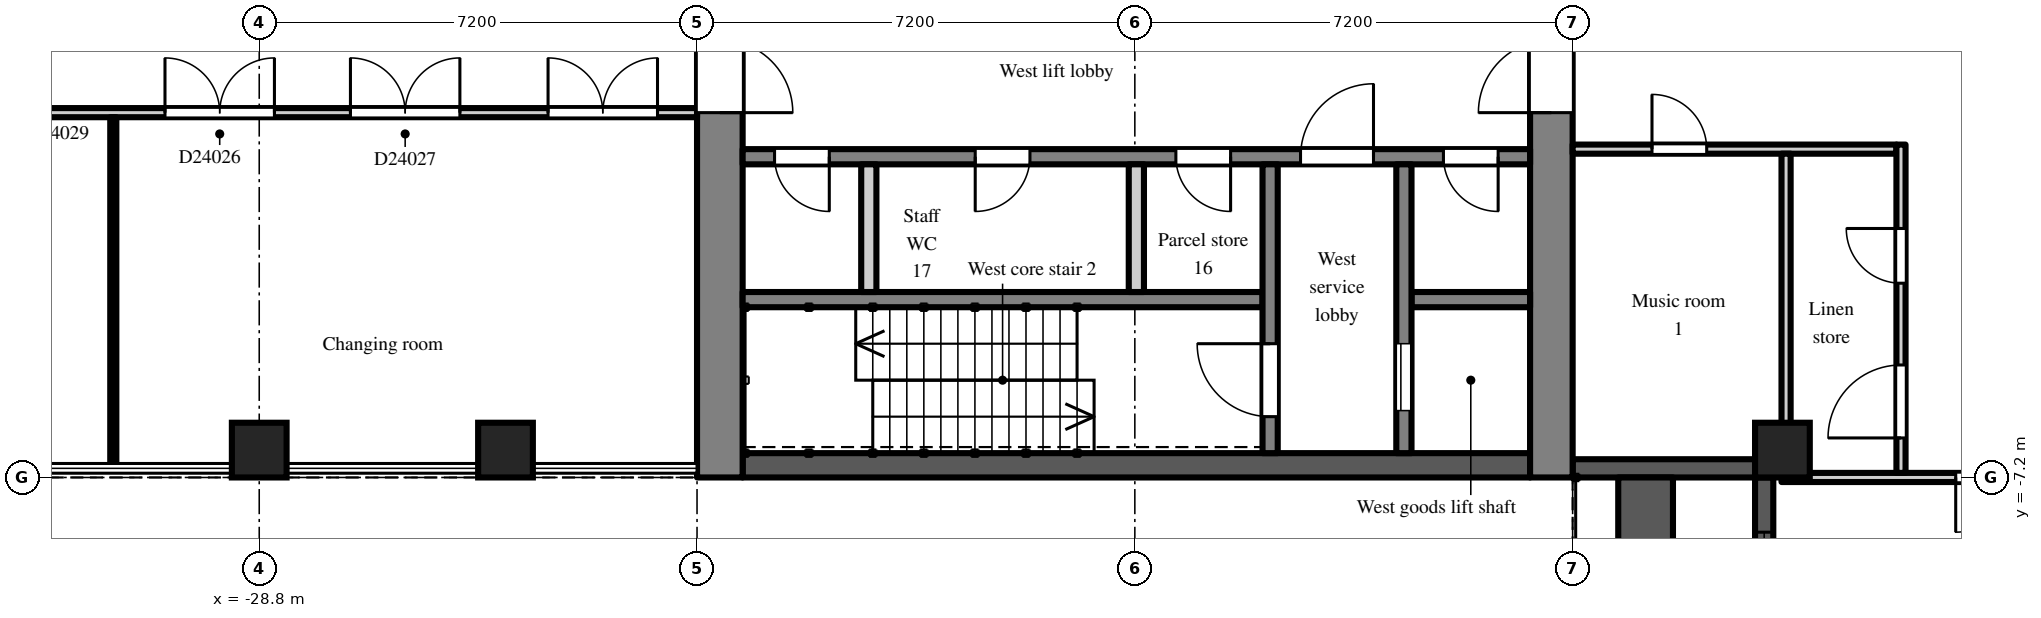
"""IFC4 building model, lengths in metres.
Left out: names, types, materials, properties, quantities, classifications, styles, units other than length and angle.
Written with IfcOpenShell. Run it as: python <this file> out.ifc"""

import sys

from ifc_helpers import new_model, si_unit, direction, frame, frame_2d, origin, origin_2d, place, context, subcontext, project, spatial, rectangle, extrude, element, fill, save


model = new_model("IFC4")
c1 = context("Model", 3, precision=1e-05, world=origin(), true_north=direction((0.0, 1.0)))
c2 = subcontext(c1, "Body", "Model", "MODEL_VIEW")
j1 = project(units=[si_unit("LENGTHUNIT", "METRE"), si_unit("PLANEANGLEUNIT", "RADIAN")], contexts=[c1])
p1 = place(None, origin())
s1 = spatial("IfcSite", under=j1, at=p1, CompositionType="ELEMENT")
p2 = place(p1, origin())
s2 = spatial("IfcBuilding", under=s1, at=p2, CompositionType="ELEMENT")
p3 = place(p2, frame((0.0, 0.0, 166.5)))
s3 = spatial("IfcBuildingStorey", under=s2, at=p3, CompositionType="ELEMENT", Elevation=166.5)
for number, where, z_axis, x_axis in (
    (1, (-28.8, -6.75, 0.0), (0.0, 0.0, 1.0), (1.0, 0.0, 0.0)),
    (2, (-24.75, -6.75, 0.0), (0.0, 0.0, 1.0), (1.0, 0.0, 0.0)),
    (3, (-3.75, -6.75, 0.0), (0.0, 0.0, 1.0), (1.0, 0.0, 0.0)),
):
    element("IfcColumn", number, at=place(p3, frame(where, z_axis=z_axis, x_axis=x_axis)), inside=s3, PredefinedType="COLUMN", context=c2, shape_type="SweptSolid", body=[
        extrude(rectangle(XDim=0.9, YDim=0.9, at=origin_2d()), origin(), (0.0, 0.0, 1.0), 4.2),
    ])
p4 = place(p3, frame((-7.2, -7.05, 0.0), z_axis=(0.0, 0.0, 1.0), x_axis=(1.0, 0.0, 0.0)))
e4 = element("IfcWall", 4, at=p4, inside=s3, PredefinedType="SOLIDWALL", context=c2, shape_type="SweptSolid", body=[
    extrude(rectangle(XDim=3.0, YDim=0.3, at=frame_2d((1.5, 0.0))), origin(), (0.0, 0.0, 1.0), 3.4),
])
p5 = place(p3, frame((-4.05, -7.2, 0.0), z_axis=(0.0, 0.0, 1.0), x_axis=(0.0, -1.0, 0.0)))
e5 = element("IfcWall", 5, at=p5, inside=s3, PredefinedType="SOLIDWALL", context=c2, shape_type="SweptSolid", body=[
    extrude(rectangle(XDim=7.2, YDim=0.3, at=frame_2d((3.6, 0.0))), origin(), (0.0, 0.0, 1.0), 3.4),
])
p6 = place(p5, frame((3.0, 0.0, 0.0)))
e6 = element("IfcOpeningElement", 6, at=p6, cuts=e5, PredefinedType="OPENING", context=c2, shape_type="SweptSolid", body=[
    extrude(rectangle(XDim=1.2, YDim=2.05, at=frame_2d((0.6, 1.025))), frame((0.0, 0.16, 0.0), z_axis=(0.0, -1.0, 0.0), x_axis=(1.0, 0.0, 0.0)), (0.0, 0.0, 1.0), 0.32),
])
p7 = place(p5, frame((0.9, 0.0, 0.2)))
e7 = element("IfcOpeningElement", 7, at=p7, cuts=e5, PredefinedType="OPENING", context=c2, shape_type="SweptSolid", body=[
    extrude(rectangle(XDim=1.8, YDim=1.85, at=frame_2d((0.9, 0.925))), frame((0.0, 0.16, 0.0), z_axis=(0.0, -1.0, 0.0), x_axis=(1.0, 0.0, 0.0)), (0.0, 0.0, 1.0), 0.32),
])
p8 = place(p5, frame((4.5, 0.0, 0.2)))
e8 = element("IfcOpeningElement", 8, at=p8, cuts=e5, PredefinedType="OPENING", context=c2, shape_type="SweptSolid", body=[
    extrude(rectangle(XDim=1.8, YDim=1.85, at=frame_2d((0.9, 0.925))), frame((0.0, 0.16, 0.0), z_axis=(0.0, -1.0, 0.0), x_axis=(1.0, 0.0, 0.0)), (0.0, 0.0, 1.0), 0.32),
])
p9 = place(p3, frame((-6.0, -14.4, 0.0), z_axis=(0.0, 0.0, 1.0), x_axis=(0.0, 1.0, 0.0)))
e9 = element("IfcWall", 9, at=p9, inside=s3, PredefinedType="PARAPET", context=c2, shape_type="SweptSolid", body=[
    extrude(rectangle(XDim=7.2, YDim=0.9, at=frame_2d((3.6, 0.0))), origin(), (0.0, 0.0, 1.0), 0.8),
])
p10 = place(p3, frame((-7.55, -7.2, 0.0), z_axis=(0.0, 0.0, 1.0), x_axis=(0.0, 1.0, 0.0)))
e10 = element("IfcWall", 10, at=p10, inside=s3, PredefinedType="SHEAR", context=c2, shape_type="SweptSolid", body=[
    extrude(rectangle(XDim=14.4, YDim=0.7, at=frame_2d((7.2, 0.0))), origin(), (0.0, 0.0, 1.0), 3.8),
])
p11 = place(p10, frame((6.0, 0.0, 0.0)))
e11 = element("IfcOpeningElement", 11, at=p11, cuts=e10, PredefinedType="OPENING", context=c2, shape_type="SweptSolid", body=[
    extrude(rectangle(XDim=2.4, YDim=2.2, at=frame_2d((1.2, 1.1))), frame((0.0, 0.36, 0.0), z_axis=(0.0, -1.0, 0.0), x_axis=(1.0, 0.0, 0.0)), (0.0, 0.0, 1.0), 0.72),
])
p12 = place(p3, frame((-21.225, -7.2, 0.0), z_axis=(0.0, 0.0, 1.0), x_axis=(0.0, 1.0, 0.0)))
e12 = element("IfcWall", 12, at=p12, inside=s3, PredefinedType="SHEAR", context=c2, shape_type="SweptSolid", body=[
    extrude(rectangle(XDim=14.4, YDim=0.75, at=frame_2d((7.2, 0.0))), origin(), (0.0, 0.0, 1.0), 3.8),
])
p13 = place(p12, frame((6.0, 0.0, 0.0)))
e13 = element("IfcOpeningElement", 13, at=p13, cuts=e12, PredefinedType="OPENING", context=c2, shape_type="SweptSolid", body=[
    extrude(rectangle(XDim=2.4, YDim=2.2, at=frame_2d((1.2, 1.1))), frame((0.0, 0.385, 0.0), z_axis=(0.0, -1.0, 0.0), x_axis=(1.0, 0.0, 0.0)), (0.0, 0.0, 1.0), 0.77),
])
p14 = place(p3, frame((-7.9, -7.0, 0.0), z_axis=(0.0, 0.0, 1.0), x_axis=(-1.0, 0.0, 0.0)))
e14 = element("IfcWall", 14, at=p14, inside=s3, PredefinedType="SHEAR", context=c2, shape_type="SweptSolid", body=[
    extrude(rectangle(XDim=12.95, YDim=0.4, at=frame_2d((6.475, 0.0))), origin(), (0.0, 0.0, 1.0), 3.8),
])
p15 = place(p3, frame((-7.9, -1.925, 0.0), z_axis=(0.0, 0.0, 1.0), x_axis=(-1.0, 0.0, 0.0)))
e15 = element("IfcWall", 15, at=p15, inside=s3, PredefinedType="SHEAR", context=c2, shape_type="SweptSolid", body=[
    extrude(rectangle(XDim=12.95, YDim=0.25, at=frame_2d((6.475, 0.0))), origin(), (0.0, 0.0, 1.0), 3.8),
])
p16 = place(p15, frame((0.525, 0.0, 0.0)))
e16 = element("IfcOpeningElement", 16, at=p16, cuts=e15, PredefinedType="OPENING", context=c2, shape_type="SweptSolid", body=[
    extrude(rectangle(XDim=0.9, YDim=2.1, at=frame_2d((0.45, 1.05))), frame((0.0, 0.135, 0.0), z_axis=(0.0, -1.0, 0.0), x_axis=(1.0, 0.0, 0.0)), (0.0, 0.0, 1.0), 0.27),
])
p17 = place(p15, frame((2.575, 0.0, 0.0)))
e17 = element("IfcOpeningElement", 17, at=p17, cuts=e15, PredefinedType="OPENING", context=c2, shape_type="SweptSolid", body=[
    extrude(rectangle(XDim=1.2, YDim=2.1, at=frame_2d((0.6, 1.05))), frame((0.0, 0.135, 0.0), z_axis=(0.0, -1.0, 0.0), x_axis=(1.0, 0.0, 0.0)), (0.0, 0.0, 1.0), 0.27),
])
p18 = place(p15, frame((4.925, 0.0, 0.0)))
e18 = element("IfcOpeningElement", 18, at=p18, cuts=e15, PredefinedType="OPENING", context=c2, shape_type="SweptSolid", body=[
    extrude(rectangle(XDim=0.9, YDim=2.1, at=frame_2d((0.45, 1.05))), frame((0.0, 0.135, 0.0), z_axis=(0.0, -1.0, 0.0), x_axis=(1.0, 0.0, 0.0)), (0.0, 0.0, 1.0), 0.27),
])
p19 = place(p15, frame((8.225, 0.0, 0.0)))
e19 = element("IfcOpeningElement", 19, at=p19, cuts=e15, PredefinedType="OPENING", context=c2, shape_type="SweptSolid", body=[
    extrude(rectangle(XDim=0.9, YDim=2.1, at=frame_2d((0.45, 1.05))), frame((0.0, 0.135, 0.0), z_axis=(0.0, -1.0, 0.0), x_axis=(1.0, 0.0, 0.0)), (0.0, 0.0, 1.0), 0.27),
])
p20 = place(p15, frame((11.525, 0.0, 0.0)))
e20 = element("IfcOpeningElement", 20, at=p20, cuts=e15, PredefinedType="OPENING", context=c2, shape_type="SweptSolid", body=[
    extrude(rectangle(XDim=0.9, YDim=2.1, at=frame_2d((0.45, 1.05))), frame((0.0, 0.135, 0.0), z_axis=(0.0, -1.0, 0.0), x_axis=(1.0, 0.0, 0.0)), (0.0, 0.0, 1.0), 0.27),
])
p21 = place(p3, frame((-7.9, -4.275, 0.0), z_axis=(0.0, 0.0, 1.0), x_axis=(-1.0, 0.0, 0.0)))
e21 = element("IfcWall", 21, at=p21, inside=s3, PredefinedType="SHEAR", context=c2, shape_type="SweptSolid", body=[
    extrude(rectangle(XDim=1.95, YDim=0.25, at=frame_2d((0.975, 0.0))), origin(), (0.0, 0.0, 1.0), 3.8),
])
p22 = place(p3, frame((-12.3, -4.275, 0.0), z_axis=(0.0, 0.0, 1.0), x_axis=(-1.0, 0.0, 0.0)))
e22 = element("IfcWall", 22, at=p22, inside=s3, PredefinedType="SHEAR", context=c2, shape_type="SweptSolid", body=[
    extrude(rectangle(XDim=8.55, YDim=0.25, at=frame_2d((4.275, 0.0))), origin(), (0.0, 0.0, 1.0), 3.8),
])
p23 = place(p3, frame((-9.975, -2.05, 0.0), z_axis=(0.0, 0.0, 1.0), x_axis=(0.0, -1.0, 0.0)))
e23 = element("IfcWall", 23, at=p23, inside=s3, PredefinedType="SHEAR", context=c2, shape_type="SweptSolid", body=[
    extrude(rectangle(XDim=4.75, YDim=0.25, at=frame_2d((2.375, 0.0))), origin(), (0.0, 0.0, 1.0), 3.8),
])
p24 = place(p23, frame((2.95, 0.0, 0.0)))
e24 = element("IfcOpeningElement", 24, at=p24, cuts=e23, PredefinedType="OPENING", context=c2, shape_type="SweptSolid", body=[
    extrude(rectangle(XDim=1.1, YDim=2.1, at=frame_2d((0.55, 1.05))), frame((0.0, 0.135, 0.0), z_axis=(0.0, -1.0, 0.0), x_axis=(1.0, 0.0, 0.0)), (0.0, 0.0, 1.0), 0.27),
])
p25 = place(p3, frame((-12.175, -2.05, 0.0), z_axis=(0.0, 0.0, 1.0), x_axis=(0.0, -1.0, 0.0)))
e25 = element("IfcWall", 25, at=p25, inside=s3, PredefinedType="SHEAR", context=c2, shape_type="SweptSolid", body=[
    extrude(rectangle(XDim=4.75, YDim=0.25, at=frame_2d((2.375, 0.0))), origin(), (0.0, 0.0, 1.0), 3.8),
])
p26 = place(p25, frame((2.95, 0.0, 0.0)))
e26 = element("IfcOpeningElement", 26, at=p26, cuts=e25, PredefinedType="OPENING", context=c2, shape_type="SweptSolid", body=[
    extrude(rectangle(XDim=1.2, YDim=2.1, at=frame_2d((0.6, 1.05))), frame((0.0, 0.135, 0.0), z_axis=(0.0, -1.0, 0.0), x_axis=(1.0, 0.0, 0.0)), (0.0, 0.0, 1.0), 0.27),
])
for number, where, z_axis, x_axis in (
    (27, (-14.375, -2.05, 0.0), (0.0, 0.0, 1.0), (0.0, -1.0, 0.0)),
    (28, (-18.775, -2.05, 0.0), (0.0, 0.0, 1.0), (0.0, -1.0, 0.0)),
):
    element("IfcWall", number, at=place(p3, frame(where, z_axis=z_axis, x_axis=x_axis)), inside=s3, PredefinedType="PARTITIONING", context=c2, shape_type="SweptSolid", body=[
        extrude(rectangle(XDim=2.1, YDim=0.25, at=frame_2d((1.05, 0.0))), origin(), (0.0, 0.0, 1.0), 3.8),
    ])
p27 = place(p3, frame((-36.5, -1.2, 0.0), z_axis=(0.0, 0.0, 1.0), x_axis=(1.0, 0.0, 0.0)))
e29 = element("IfcWall", 29, at=p27, inside=s3, PredefinedType="PARTITIONING", context=c2, shape_type="SweptSolid", body=[
    extrude(rectangle(XDim=14.9, YDim=0.15, at=frame_2d((7.45, 0.0))), origin(), (0.0, 0.0, 1.0), 3.8),
])
p28 = place(p27, frame((6.15, 0.0, 0.0)))
e30 = element("IfcOpeningElement", 30, at=p28, cuts=e29, PredefinedType="OPENING", context=c2, shape_type="SweptSolid", body=[
    extrude(rectangle(XDim=1.8, YDim=2.1, at=frame_2d((0.9, 1.05))), frame((0.0, 0.085, 0.0), z_axis=(0.0, -1.0, 0.0), x_axis=(1.0, 0.0, 0.0)), (0.0, 0.0, 1.0), 0.17),
])
p29 = place(p27, frame((9.2, 0.0, 0.0)))
e31 = element("IfcOpeningElement", 31, at=p29, cuts=e29, PredefinedType="OPENING", context=c2, shape_type="SweptSolid", body=[
    extrude(rectangle(XDim=1.8, YDim=2.1, at=frame_2d((0.9, 1.05))), frame((0.0, 0.085, 0.0), z_axis=(0.0, -1.0, 0.0), x_axis=(1.0, 0.0, 0.0)), (0.0, 0.0, 1.0), 0.17),
])
p30 = place(p27, frame((12.45, 0.0, 0.0)))
e32 = element("IfcOpeningElement", 32, at=p30, cuts=e29, PredefinedType="OPENING", context=c2, shape_type="SweptSolid", body=[
    extrude(rectangle(XDim=1.8, YDim=2.1, at=frame_2d((0.9, 1.05))), frame((0.0, 0.085, 0.0), z_axis=(0.0, -1.0, 0.0), x_axis=(1.0, 0.0, 0.0)), (0.0, 0.0, 1.0), 0.17),
])
p31 = place(p27, frame((2.15, 0.0, 0.0)))
e33 = element("IfcOpeningElement", 33, at=p31, cuts=e29, PredefinedType="OPENING", context=c2, shape_type="SweptSolid", body=[
    extrude(rectangle(XDim=1.0, YDim=2.1, at=frame_2d((0.5, 1.05))), frame((0.0, 0.085, 0.0), z_axis=(0.0, -1.0, 0.0), x_axis=(1.0, 0.0, 0.0)), (0.0, 0.0, 1.0), 0.17),
])
p32 = place(p3, frame((-31.2, -7.02, 0.0), z_axis=(0.0, 0.0, 1.0), x_axis=(0.0, 1.0, 0.0)))
e34 = element("IfcWall", 34, at=p32, inside=s3, PredefinedType="PARTITIONING", context=c2, shape_type="SweptSolid", body=[
    extrude(rectangle(XDim=5.745, YDim=0.1, at=frame_2d((2.873, 0.0))), origin(), (0.0, 0.0, 1.0), 3.8),
])
p33 = place(p3, frame((-7.2, -1.8, 0.0), z_axis=(0.0, 0.0, 1.0), x_axis=(1.0, 0.0, 0.0)))
e35 = element("IfcWall", 35, at=p33, inside=s3, PredefinedType="PARTITIONING", context=c2, shape_type="SweptSolid", body=[
    extrude(rectangle(XDim=5.325, YDim=0.15, at=frame_2d((2.663, 0.0))), origin(), (0.0, 0.0, 1.0), 3.8),
])
p34 = place(p33, frame((1.305, 0.0, 0.0)))
e36 = element("IfcOpeningElement", 36, at=p34, cuts=e35, PredefinedType="OPENING", context=c2, shape_type="SweptSolid", body=[
    extrude(rectangle(XDim=0.9, YDim=2.1, at=frame_2d((0.45, 1.05))), frame((0.0, 0.085, 0.0), z_axis=(0.0, -1.0, 0.0), x_axis=(1.0, 0.0, 0.0)), (0.0, 0.0, 1.0), 0.17),
])
p35 = place(p3, frame((-3.69, -7.125, 0.0), z_axis=(0.0, 0.0, 1.0), x_axis=(0.0, 1.0, 0.0)))
e37 = element("IfcWall", 37, at=p35, inside=s3, PredefinedType="PARTITIONING", context=c2, shape_type="SweptSolid", body=[
    extrude(rectangle(XDim=5.25, YDim=0.15, at=frame_2d((2.625, 0.0))), origin(), (0.0, 0.0, 1.0), 3.8),
])
p36 = place(p3, frame((-3.765, -7.2, 0.0), z_axis=(0.0, 0.0, 1.0), x_axis=(1.0, 0.0, 0.0)))
e38 = element("IfcWall", 38, at=p36, inside=s3, PredefinedType="PARTITIONING", context=c2, shape_type="SweptSolid", body=[
    extrude(rectangle(XDim=5.565, YDim=0.15, at=frame_2d((2.782, 0.0))), origin(), (0.0, 0.0, 1.0), 3.8),
])
p37 = place(p36, frame((2.865, 0.0, 0.0)))
e39 = element("IfcOpeningElement", 39, at=p37, cuts=e38, PredefinedType="OPENING", context=c2, shape_type="SweptSolid", body=[
    extrude(rectangle(XDim=1.8, YDim=2.1, at=frame_2d((0.9, 1.05))), frame((0.0, 0.085, 0.0), z_axis=(0.0, -1.0, 0.0), x_axis=(1.0, 0.0, 0.0)), (0.0, 0.0, 1.0), 0.17),
])
p38 = place(p3, frame((-1.8, -7.125, 0.0), z_axis=(0.0, 0.0, 1.0), x_axis=(0.0, 1.0, 0.0)))
e40 = element("IfcWall", 40, at=p38, inside=s3, PredefinedType="PARTITIONING", context=c2, shape_type="SweptSolid", body=[
    extrude(rectangle(XDim=5.4, YDim=0.15, at=frame_2d((2.7, 0.0))), origin(), (0.0, 0.0, 1.0), 3.8),
])
p39 = place(p38, frame((0.575, 0.0, 0.0)))
e41 = element("IfcOpeningElement", 41, at=p39, cuts=e40, PredefinedType="OPENING", context=c2, shape_type="SweptSolid", body=[
    extrude(rectangle(XDim=1.2, YDim=2.1, at=frame_2d((0.6, 1.05))), frame((0.0, 0.085, 0.0), z_axis=(0.0, -1.0, 0.0), x_axis=(1.0, 0.0, 0.0)), (0.0, 0.0, 1.0), 0.17),
])
p40 = place(p38, frame((3.12, 0.0, 0.0)))
e42 = element("IfcOpeningElement", 42, at=p40, cuts=e40, PredefinedType="OPENING", context=c2, shape_type="SweptSolid", body=[
    extrude(rectangle(XDim=0.9, YDim=2.1, at=frame_2d((0.45, 1.05))), frame((0.0, 0.085, 0.0), z_axis=(0.0, -1.0, 0.0), x_axis=(1.0, 0.0, 0.0)), (0.0, 0.0, 1.0), 0.17),
])
p41 = place(p7, origin())
e43 = element("IfcWindow", 43, at=p41, inside=s3, PartitioningType="SINGLE_PANEL", PredefinedType="WINDOW", context=c2, shape_type="SweptSolid", body=[
    extrude(rectangle(XDim=1.8, YDim=1.85, at=frame_2d((0.9, 0.925))), frame((0.0, 0.03, 0.0), z_axis=(0.0, -1.0, 0.0), x_axis=(1.0, 0.0, 0.0)), (0.0, 0.0, 1.0), 0.06),
])
fill(e7, e43)
p42 = place(p24, origin())
e44 = element("IfcDoor", 44, at=p42, inside=s3, OperationType="SLIDING_TO_LEFT", PredefinedType="DOOR", context=c2, shape_type="SweptSolid", body=[
    extrude(rectangle(XDim=1.1, YDim=2.1, at=frame_2d((0.55, 1.05))), frame((0.0, 0.025, 0.0), z_axis=(0.0, -1.0, 0.0), x_axis=(1.0, 0.0, 0.0)), (0.0, 0.0, 1.0), 0.05),
])
fill(e24, e44)
p43 = place(p26, frame((1.2, 0.0, 0.0), z_axis=(0.0, 0.0, 1.0), x_axis=(-1.0, 0.0, 0.0)))
e45 = element("IfcDoor", 45, at=p43, inside=s3, OperationType="SINGLE_SWING_RIGHT", PredefinedType="DOOR", context=c2, shape_type="SweptSolid", body=[
    extrude(rectangle(XDim=1.2, YDim=2.1, at=frame_2d((0.6, 1.05))), frame((0.0, 0.025, 0.0), z_axis=(0.0, -1.0, 0.0), x_axis=(1.0, 0.0, 0.0)), (0.0, 0.0, 1.0), 0.05),
])
fill(e26, e45)
p44 = place(p16, origin())
e46 = element("IfcDoor", 46, at=p44, inside=s3, OperationType="SINGLE_SWING_LEFT", PredefinedType="DOOR", context=c2, shape_type="SweptSolid", body=[
    extrude(rectangle(XDim=0.9, YDim=2.1, at=frame_2d((0.45, 1.05))), frame((0.0, 0.025, 0.0), z_axis=(0.0, -1.0, 0.0), x_axis=(1.0, 0.0, 0.0)), (0.0, 0.0, 1.0), 0.05),
])
fill(e16, e46)
p45 = place(p17, frame((1.2, 0.0, 0.0), z_axis=(0.0, 0.0, 1.0), x_axis=(-1.0, 0.0, 0.0)))
e47 = element("IfcDoor", 47, at=p45, inside=s3, OperationType="SINGLE_SWING_RIGHT", PredefinedType="DOOR", context=c2, shape_type="SweptSolid", body=[
    extrude(rectangle(XDim=1.2, YDim=2.1, at=frame_2d((0.6, 1.05))), frame((0.0, 0.025, 0.0), z_axis=(0.0, -1.0, 0.0), x_axis=(1.0, 0.0, 0.0)), (0.0, 0.0, 1.0), 0.05),
])
fill(e17, e47)
p46 = place(p11, origin())
e48 = element("IfcDoor", 48, at=p46, inside=s3, OperationType="DOUBLE_DOOR_DOUBLE_SWING", PredefinedType="DOOR", context=c2, shape_type="SweptSolid", body=[
    extrude(rectangle(XDim=2.4, YDim=2.2, at=frame_2d((1.2, 1.1))), frame((0.0, 0.025, 0.0), z_axis=(0.0, -1.0, 0.0), x_axis=(1.0, 0.0, 0.0)), (0.0, 0.0, 1.0), 0.05),
])
fill(e11, e48)
p47 = place(p13, frame((2.4, 0.0, 0.0), z_axis=(0.0, 0.0, 1.0), x_axis=(-1.0, 0.0, 0.0)))
e49 = element("IfcDoor", 49, at=p47, inside=s3, OperationType="DOUBLE_DOOR_DOUBLE_SWING", PredefinedType="DOOR", context=c2, shape_type="SweptSolid", body=[
    extrude(rectangle(XDim=2.4, YDim=2.2, at=frame_2d((1.2, 1.1))), frame((0.0, 0.025, 0.0), z_axis=(0.0, -1.0, 0.0), x_axis=(1.0, 0.0, 0.0)), (0.0, 0.0, 1.0), 0.05),
])
fill(e13, e49)
p48 = place(p18, origin())
e50 = element("IfcDoor", 50, at=p48, inside=s3, OperationType="SINGLE_SWING_LEFT", PredefinedType="DOOR", context=c2, shape_type="SweptSolid", body=[
    extrude(rectangle(XDim=0.9, YDim=2.1, at=frame_2d((0.45, 1.05))), frame((0.0, 0.025, 0.0), z_axis=(0.0, -1.0, 0.0), x_axis=(1.0, 0.0, 0.0)), (0.0, 0.0, 1.0), 0.05),
])
fill(e18, e50)
p49 = place(p19, origin())
e51 = element("IfcDoor", 51, at=p49, inside=s3, OperationType="SINGLE_SWING_RIGHT", PredefinedType="DOOR", context=c2, shape_type="SweptSolid", body=[
    extrude(rectangle(XDim=0.9, YDim=2.1, at=frame_2d((0.45, 1.05))), frame((0.0, 0.025, 0.0), z_axis=(0.0, -1.0, 0.0), x_axis=(1.0, 0.0, 0.0)), (0.0, 0.0, 1.0), 0.05),
])
fill(e19, e51)
p50 = place(p20, origin())
e52 = element("IfcDoor", 52, at=p50, inside=s3, OperationType="SINGLE_SWING_LEFT", PredefinedType="DOOR", context=c2, shape_type="SweptSolid", body=[
    extrude(rectangle(XDim=0.9, YDim=2.1, at=frame_2d((0.45, 1.05))), frame((0.0, 0.025, 0.0), z_axis=(0.0, -1.0, 0.0), x_axis=(1.0, 0.0, 0.0)), (0.0, 0.0, 1.0), 0.05),
])
fill(e20, e52)
p51 = place(p39, origin())
e53 = element("IfcDoor", 53, at=p51, inside=s3, OperationType="SINGLE_SWING_LEFT", PredefinedType="DOOR", context=c2, shape_type="SweptSolid", body=[
    extrude(rectangle(XDim=1.2, YDim=2.1, at=frame_2d((0.6, 1.05))), frame((0.0, 0.025, 0.0), z_axis=(0.0, -1.0, 0.0), x_axis=(1.0, 0.0, 0.0)), (0.0, 0.0, 1.0), 0.05),
])
fill(e41, e53)
p52 = place(p40, origin())
e54 = element("IfcDoor", 54, at=p52, inside=s3, OperationType="SINGLE_SWING_RIGHT", PredefinedType="DOOR", context=c2, shape_type="SweptSolid", body=[
    extrude(rectangle(XDim=0.9, YDim=2.1, at=frame_2d((0.45, 1.05))), frame((0.0, 0.025, 0.0), z_axis=(0.0, -1.0, 0.0), x_axis=(1.0, 0.0, 0.0)), (0.0, 0.0, 1.0), 0.05),
])
fill(e42, e54)
p53 = place(p34, origin())
e55 = element("IfcDoor", 55, at=p53, inside=s3, OperationType="SINGLE_SWING_LEFT", PredefinedType="DOOR", context=c2, shape_type="SweptSolid", body=[
    extrude(rectangle(XDim=0.9, YDim=2.1, at=frame_2d((0.45, 1.05))), frame((0.0, 0.025, 0.0), z_axis=(0.0, -1.0, 0.0), x_axis=(1.0, 0.0, 0.0)), (0.0, 0.0, 1.0), 0.05),
])
fill(e36, e55)
p54 = place(p37, frame((1.8, 0.0, 0.0), z_axis=(0.0, 0.0, 1.0), x_axis=(-1.0, 0.0, 0.0)))
e56 = element("IfcDoor", 56, at=p54, inside=s3, OperationType="DOUBLE_DOOR_DOUBLE_SWING", PredefinedType="DOOR", context=c2, shape_type="SweptSolid", body=[
    extrude(rectangle(XDim=1.8, YDim=2.1, at=frame_2d((0.9, 1.05))), frame((0.0, 0.025, 0.0), z_axis=(0.0, -1.0, 0.0), x_axis=(1.0, 0.0, 0.0)), (0.0, 0.0, 1.0), 0.05),
])
fill(e39, e56)
p55 = place(p28, origin())
e57 = element("IfcDoor", 57, at=p55, inside=s3, OperationType="DOUBLE_DOOR_DOUBLE_SWING", PredefinedType="DOOR", context=c2, shape_type="SweptSolid", body=[
    extrude(rectangle(XDim=1.8, YDim=2.1, at=frame_2d((0.9, 1.05))), frame((0.0, 0.025, 0.0), z_axis=(0.0, -1.0, 0.0), x_axis=(1.0, 0.0, 0.0)), (0.0, 0.0, 1.0), 0.05),
])
fill(e30, e57)
p56 = place(p29, origin())
e58 = element("IfcDoor", 58, at=p56, inside=s3, OperationType="DOUBLE_DOOR_DOUBLE_SWING", PredefinedType="DOOR", context=c2, shape_type="SweptSolid", body=[
    extrude(rectangle(XDim=1.8, YDim=2.1, at=frame_2d((0.9, 1.05))), frame((0.0, 0.025, 0.0), z_axis=(0.0, -1.0, 0.0), x_axis=(1.0, 0.0, 0.0)), (0.0, 0.0, 1.0), 0.05),
])
fill(e31, e58)
p57 = place(p30, origin())
e59 = element("IfcDoor", 59, at=p57, inside=s3, OperationType="DOUBLE_DOOR_DOUBLE_SWING", PredefinedType="DOOR", context=c2, shape_type="SweptSolid", body=[
    extrude(rectangle(XDim=1.8, YDim=2.1, at=frame_2d((0.9, 1.05))), frame((0.0, 0.025, 0.0), z_axis=(0.0, -1.0, 0.0), x_axis=(1.0, 0.0, 0.0)), (0.0, 0.0, 1.0), 0.05),
])
fill(e32, e59)
save(model, sys.argv[1])
